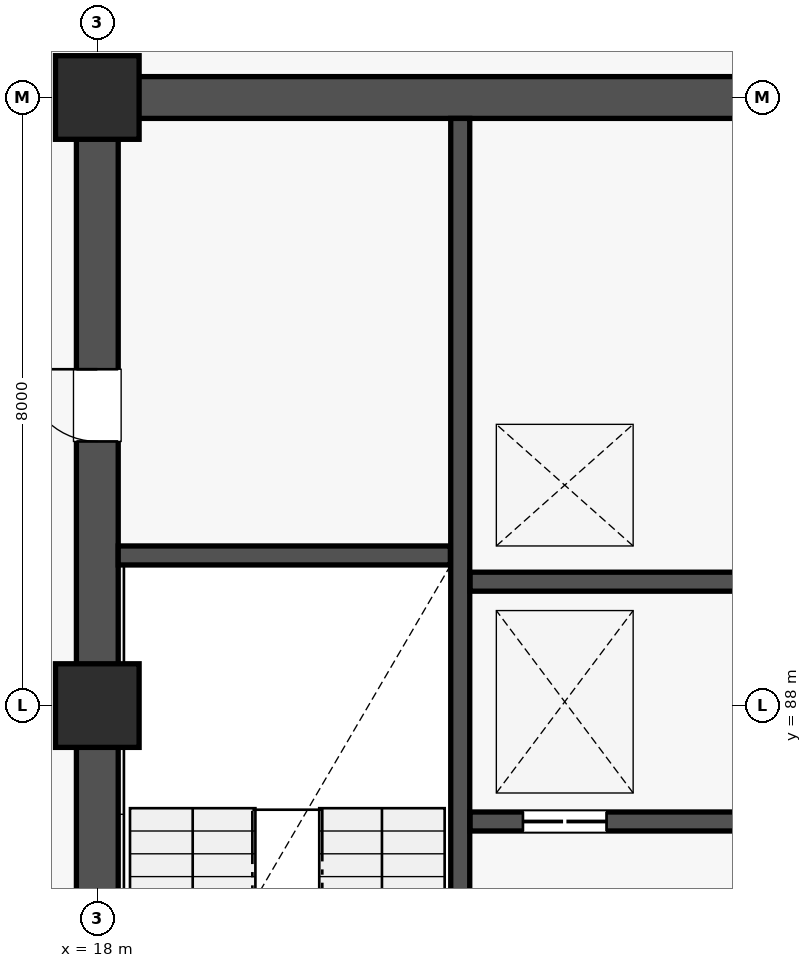
"""IFC4 building model, lengths in metres.
Left out: names, types, materials, properties, quantities, classifications, styles, units other than length and angle.
Written with IfcOpenShell. Run it as: python <this file> out.ifc"""

import sys

from ifc_helpers import new_model, si_unit, direction, frame, frame_2d, origin, origin_2d, place, context, subcontext, project, spatial, rectangle, extrude, element, fill, save


model = new_model("IFC4")
c1 = context("Model", 3, precision=1e-05, world=origin(), true_north=direction((0.0, 1.0)))
c2 = subcontext(c1, "Body", "Model", "MODEL_VIEW")
j1 = project(units=[si_unit("LENGTHUNIT", "METRE"), si_unit("PLANEANGLEUNIT", "RADIAN")], contexts=[c1])
p1 = place(None, origin())
s1 = spatial("IfcSite", under=j1, at=p1, CompositionType="ELEMENT")
p2 = place(p1, origin())
s2 = spatial("IfcBuilding", under=s1, at=p2, CompositionType="ELEMENT")
p3 = place(p2, frame((0.0, 0.0, -4.5)))
s3 = spatial("IfcBuildingStorey", under=s2, at=p3, CompositionType="ELEMENT", Elevation=-4.5)
for number, where, z_axis, x_axis in (
    (1, (18.0, 88.0, 0.0), (0.0, 0.0, 1.0), (1.0, 0.0, 0.0)),
    (2, (18.0, 96.0, 0.0), (0.0, 0.0, 1.0), (1.0, 0.0, 0.0)),
):
    element("IfcColumn", number, at=place(p3, frame(where, z_axis=z_axis, x_axis=x_axis)), inside=s3, PredefinedType="COLUMN", context=c2, shape_type="SweptSolid", body=[
        extrude(rectangle(XDim=1.1, YDim=1.1, at=origin_2d()), origin(), (0.0, 0.0, 1.0), 4.5),
    ])
p4 = place(p3, frame((18.275, 96.0, 0.0), z_axis=(0.0, 0.0, 1.0), x_axis=(1.0, 0.0, 0.0)))
e3 = element("IfcWall", 3, at=p4, inside=s3, PredefinedType="SHEAR", context=c2, shape_type="SweptSolid", body=[
    extrude(rectangle(XDim=8.45, YDim=0.55, at=frame_2d((4.225, 0.0))), origin(), (0.0, 0.0, 1.0), 4.15),
])
p5 = place(p3, frame((18.0, 80.275, 0.0), z_axis=(0.0, 0.0, 1.0), x_axis=(0.0, 1.0, 0.0)))
e4 = element("IfcWall", 4, at=p5, inside=s3, PredefinedType="SHEAR", context=c2, shape_type="SweptSolid", body=[
    extrude(rectangle(XDim=15.45, YDim=0.55, at=frame_2d((7.725, 0.0))), origin(), (0.0, 0.0, 1.0), 4.15),
])
p6 = place(p5, frame((11.2, 0.0, 0.0)))
e5 = element("IfcOpeningElement", 5, at=p6, cuts=e4, PredefinedType="OPENING", context=c2, shape_type="SweptSolid", body=[
    extrude(rectangle(XDim=0.95, YDim=2.1, at=frame_2d((0.475, 1.05))), frame((0.0, 0.287, 0.0), z_axis=(0.0, -1.0, 0.0), x_axis=(1.0, 0.0, 0.0)), (0.0, 0.0, 1.0), 0.574),
])
p7 = place(p3, frame((22.775, 80.275, 0.0), z_axis=(0.0, 0.0, 1.0), x_axis=(0.0, 1.0, 0.0)))
e6 = element("IfcWall", 6, at=p7, inside=s3, PredefinedType="SOLIDWALL", context=c2, shape_type="SweptSolid", body=[
    extrude(rectangle(XDim=15.45, YDim=0.25, at=frame_2d((7.725, 0.0))), origin(), (0.0, 0.0, 1.0), 4.15),
])
p8 = place(p7, frame((0.45, 0.0, 0.0)))
e7 = element("IfcOpeningElement", 7, at=p8, cuts=e6, PredefinedType="OPENING", context=c2, shape_type="SweptSolid", body=[
    extrude(rectangle(XDim=1.1, YDim=2.15, at=frame_2d((0.55, 1.075))), frame((0.0, 0.137, 0.0), z_axis=(0.0, -1.0, 0.0), x_axis=(1.0, 0.0, 0.0)), (0.0, 0.0, 1.0), 0.274),
])
p9 = place(p3, frame((18.275, 89.975, 0.0), z_axis=(0.0, 0.0, 1.0), x_axis=(1.0, 0.0, 0.0)))
e8 = element("IfcWall", 8, at=p9, inside=s3, PredefinedType="SOLIDWALL", context=c2, shape_type="SweptSolid", body=[
    extrude(rectangle(XDim=4.37, YDim=0.25, at=frame_2d((2.185, 0.0))), origin(), (0.0, 0.0, 1.0), 4.15),
])
p10 = place(p3, frame((22.905, 86.475, 0.0), z_axis=(0.0, 0.0, 1.0), x_axis=(1.0, 0.0, 0.0)))
e9 = element("IfcWall", 9, at=p10, inside=s3, PredefinedType="SOLIDWALL", context=c2, shape_type="SweptSolid", body=[
    extrude(rectangle(XDim=3.82, YDim=0.25, at=frame_2d((1.91, 0.0))), origin(), (0.0, 0.0, 1.0), 4.15),
])
p11 = place(p10, frame((0.695, 0.0, 0.0)))
e10 = element("IfcOpeningElement", 10, at=p11, cuts=e9, PredefinedType="OPENING", context=c2, shape_type="SweptSolid", body=[
    extrude(rectangle(XDim=1.1, YDim=2.12, at=frame_2d((0.55, 1.06))), frame((0.0, 0.137, 0.0), z_axis=(0.0, -1.0, 0.0), x_axis=(1.0, 0.0, 0.0)), (0.0, 0.0, 1.0), 0.274),
])
p12 = place(p3, frame((22.905, 89.63, 0.0), z_axis=(0.0, 0.0, 1.0), x_axis=(1.0, 0.0, 0.0)))
e11 = element("IfcWall", 11, at=p12, inside=s3, PredefinedType="SOLIDWALL", context=c2, shape_type="SweptSolid", body=[
    extrude(rectangle(XDim=3.82, YDim=0.25, at=frame_2d((1.91, 0.0))), origin(), (0.0, 0.0, 1.0), 4.15),
])
p13 = place(p6, origin())
e12 = element("IfcDoor", 12, at=p13, inside=s3, OperationType="SINGLE_SWING_RIGHT", PredefinedType="DOOR", context=c2, shape_type="SweptSolid", body=[
    extrude(rectangle(XDim=0.95, YDim=2.1, at=frame_2d((0.475, 1.05))), frame((0.0, 0.025, 0.0), z_axis=(0.0, -1.0, 0.0), x_axis=(1.0, 0.0, 0.0)), (0.0, 0.0, 1.0), 0.05),
])
fill(e5, e12)
p14 = place(p11, origin())
e13 = element("IfcDoor", 13, at=p14, inside=s3, OperationType="DOUBLE_DOOR_SLIDING", PredefinedType="DOOR", context=c2, shape_type="SweptSolid", body=[
    extrude(rectangle(XDim=1.1, YDim=2.12, at=frame_2d((0.55, 1.06))), frame((0.0, 0.025, 0.0), z_axis=(0.0, -1.0, 0.0), x_axis=(1.0, 0.0, 0.0)), (0.0, 0.0, 1.0), 0.05),
])
fill(e10, e13)
save(model, sys.argv[1])
